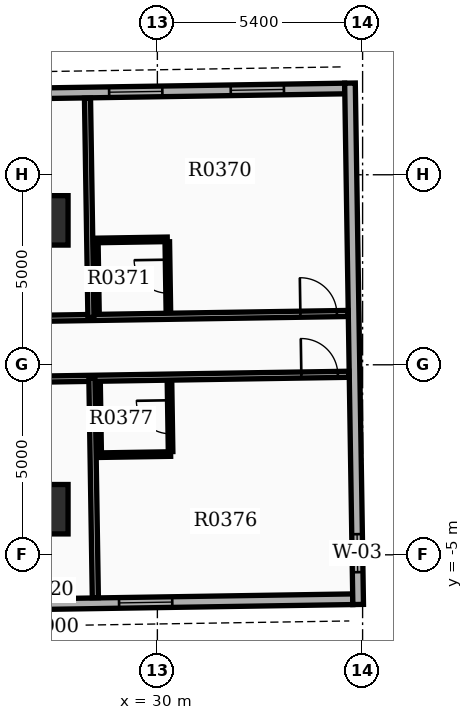
"""IFC4 building model, lengths in metres.
Left out: names, types, materials, properties, quantities, classifications, styles, units other than length and angle.
Written with IfcOpenShell. Run it as: python <this file> out.ifc"""

import sys

from ifc_helpers import new_model, si_unit, direction, frame, frame_2d, origin, origin_2d, place, context, subcontext, project, spatial, rectangle, extrude, element, fill, save


model = new_model("IFC4")
c1 = context("Model", 3, precision=1e-05, world=origin(), true_north=direction((0.0, 1.0)))
c2 = subcontext(c1, "Body", "Model", "MODEL_VIEW")
j1 = project(units=[si_unit("LENGTHUNIT", "METRE"), si_unit("PLANEANGLEUNIT", "RADIAN")], contexts=[c1])
p1 = place(None, origin())
s1 = spatial("IfcSite", under=j1, at=p1, CompositionType="ELEMENT")
p2 = place(p1, origin())
s2 = spatial("IfcBuilding", under=s1, at=p2, CompositionType="ELEMENT")
p3 = place(p2, frame((0.0, 0.0, 27.6)))
s3 = spatial("IfcBuildingStorey", under=s2, at=p3, CompositionType="ELEMENT", Elevation=27.6)
for number, where, z_axis, x_axis in (
    (1, (27.0, -3.8, 0.0), (0.0, 0.0, 1.0), (1.0, 0.0, 0.0)),
    (2, (27.0, 3.8, 0.0), (0.0, 0.0, 1.0), (1.0, 0.0, 0.0)),
):
    element("IfcColumn", number, at=place(p3, frame(where, z_axis=z_axis, x_axis=x_axis)), inside=s3, PredefinedType="COLUMN", context=c2, shape_type="SweptSolid", body=[
        extrude(rectangle(XDim=1.3, YDim=1.3, at=origin_2d()), origin(), (0.0, 0.0, 1.0), 3.9),
    ])
p4 = place(p3, frame((15.044, -6.485, 0.0), z_axis=(0.0, 0.0, 1.0), x_axis=(0.999876474133, 0.01571739401, 0.0)))
e3 = element("IfcWall", 3, at=p4, inside=s3, PredefinedType="STANDARD", context=c2, shape_type="SweptSolid", body=[
    extrude(rectangle(XDim=20.1, YDim=0.28, at=frame_2d((10.05, 0.0))), origin(), (0.0, 0.0, 1.0), 2.91),
])
p5 = place(p4, frame((1.6, 0.0, 0.8)))
e4 = element("IfcOpeningElement", 4, at=p5, cuts=e3, PredefinedType="OPENING", context=c2, shape_type="SweptSolid", body=[
    extrude(rectangle(XDim=1.4, YDim=1.6, at=frame_2d((0.7, 0.8))), frame((0.0, 0.15, 0.0), z_axis=(0.0, -1.0, 0.0), x_axis=(1.0, 0.0, 0.0)), (0.0, 0.0, 1.0), 0.3),
])
p6 = place(p4, frame((6.8, 0.0, 0.8)))
e5 = element("IfcOpeningElement", 5, at=p6, cuts=e3, PredefinedType="OPENING", context=c2, shape_type="SweptSolid", body=[
    extrude(rectangle(XDim=1.4, YDim=1.6, at=frame_2d((0.7, 0.8))), frame((0.0, 0.15, 0.0), z_axis=(0.0, -1.0, 0.0), x_axis=(1.0, 0.0, 0.0)), (0.0, 0.0, 1.0), 0.3),
])
p7 = place(p4, frame((10.0, 0.0, 0.8)))
e6 = element("IfcOpeningElement", 6, at=p7, cuts=e3, PredefinedType="OPENING", context=c2, shape_type="SweptSolid", body=[
    extrude(rectangle(XDim=1.4, YDim=1.6, at=frame_2d((0.7, 0.8))), frame((0.0, 0.15, 0.0), z_axis=(0.0, -1.0, 0.0), x_axis=(1.0, 0.0, 0.0)), (0.0, 0.0, 1.0), 0.3),
])
p8 = place(p4, frame((13.95, 0.0, 0.8)))
e7 = element("IfcOpeningElement", 7, at=p8, cuts=e3, PredefinedType="OPENING", context=c2, shape_type="SweptSolid", body=[
    extrude(rectangle(XDim=1.4, YDim=1.6, at=frame_2d((0.7, 0.8))), frame((0.0, 0.15, 0.0), z_axis=(0.0, -1.0, 0.0), x_axis=(1.0, 0.0, 0.0)), (0.0, 0.0, 1.0), 0.3),
])
p9 = place(p3, frame((34.93, 7.27, 0.0), z_axis=(0.0, 0.0, 1.0), x_axis=(-0.999876667941, -0.015705059908, 0.0)))
e8 = element("IfcWall", 8, at=p9, inside=s3, PredefinedType="STANDARD", context=c2, shape_type="SweptSolid", body=[
    extrude(rectangle(XDim=20.1, YDim=0.28, at=frame_2d((10.05, 0.0))), origin(), (0.0, 0.0, 1.0), 2.91),
])
p10 = place(p9, frame((1.6, 0.0, 0.8)))
e9 = element("IfcOpeningElement", 9, at=p10, cuts=e8, PredefinedType="OPENING", context=c2, shape_type="SweptSolid", body=[
    extrude(rectangle(XDim=1.4, YDim=1.6, at=frame_2d((0.7, 0.8))), frame((0.0, 0.15, 0.0), z_axis=(0.0, -1.0, 0.0), x_axis=(1.0, 0.0, 0.0)), (0.0, 0.0, 1.0), 0.3),
])
p11 = place(p9, frame((4.8, 0.0, 0.8)))
e10 = element("IfcOpeningElement", 10, at=p11, cuts=e8, PredefinedType="OPENING", context=c2, shape_type="SweptSolid", body=[
    extrude(rectangle(XDim=1.4, YDim=1.6, at=frame_2d((0.7, 0.8))), frame((0.0, 0.15, 0.0), z_axis=(0.0, -1.0, 0.0), x_axis=(1.0, 0.0, 0.0)), (0.0, 0.0, 1.0), 0.3),
])
p12 = place(p9, frame((8.0, 0.0, 0.8)))
e11 = element("IfcOpeningElement", 11, at=p12, cuts=e8, PredefinedType="OPENING", context=c2, shape_type="SweptSolid", body=[
    extrude(rectangle(XDim=1.4, YDim=1.6, at=frame_2d((0.7, 0.8))), frame((0.0, 0.15, 0.0), z_axis=(0.0, -1.0, 0.0), x_axis=(1.0, 0.0, 0.0)), (0.0, 0.0, 1.0), 0.3),
])
p13 = place(p9, frame((11.2, 0.0, 0.8)))
e12 = element("IfcOpeningElement", 12, at=p13, cuts=e8, PredefinedType="OPENING", context=c2, shape_type="SweptSolid", body=[
    extrude(rectangle(XDim=1.4, YDim=1.6, at=frame_2d((0.7, 0.8))), frame((0.0, 0.15, 0.0), z_axis=(0.0, -1.0, 0.0), x_axis=(1.0, 0.0, 0.0)), (0.0, 0.0, 1.0), 0.3),
])
p14 = place(p9, frame((15.0, 0.0, 0.0)))
e13 = element("IfcOpeningElement", 13, at=p14, cuts=e8, PredefinedType="OPENING", context=c2, shape_type="SweptSolid", body=[
    extrude(rectangle(XDim=0.96, YDim=2.1, at=frame_2d((0.48, 1.05))), frame((0.0, 0.15, 0.0), z_axis=(0.0, -1.0, 0.0), x_axis=(1.0, 0.0, 0.0)), (0.0, 0.0, 1.0), 0.3),
])
p15 = place(p3, frame((35.283, -6.307, 0.0), z_axis=(0.0, 0.0, 1.0), x_axis=(-0.015712599986, 0.999876549481, 0.0)))
e14 = element("IfcWall", 14, at=p15, inside=s3, PredefinedType="STANDARD", context=c2, shape_type="SweptSolid", body=[
    extrude(rectangle(XDim=13.72, YDim=0.28, at=frame_2d((6.86, 0.0))), origin(), (0.0, 0.0, 1.0), 2.91),
])
p16 = place(p15, frame((0.85, 0.0, 0.85)))
e15 = element("IfcOpeningElement", 15, at=p16, cuts=e14, PredefinedType="OPENING", context=c2, shape_type="SweptSolid", body=[
    extrude(rectangle(XDim=1.0, YDim=1.5, at=frame_2d((0.5, 0.75))), frame((0.0, 0.15, 0.0), z_axis=(0.0, -1.0, 0.0), x_axis=(1.0, 0.0, 0.0)), (0.0, 0.0, 1.0), 0.3),
])
p17 = place(p3, frame((14.836, 1.033, 0.0), z_axis=(0.0, 0.0, 1.0), x_axis=(0.999876717676, 0.015701893165, 0.0)))
e16 = element("IfcWall", 16, at=p17, inside=s3, PredefinedType="PARTITIONING", context=c2, shape_type="SweptSolid", body=[
    extrude(rectangle(XDim=20.182, YDim=0.16, at=frame_2d((10.091, 0.0))), origin(), (0.0, 0.0, 1.0), 2.9),
])
p18 = place(p17, frame((2.61, 0.0, 0.0)))
e17 = element("IfcOpeningElement", 17, at=p18, cuts=e16, PredefinedType="OPENING", context=c2, shape_type="SweptSolid", body=[
    extrude(rectangle(XDim=0.96, YDim=2.15, at=frame_2d((0.48, 1.075))), frame((0.0, 0.09, 0.0), z_axis=(0.0, -1.0, 0.0), x_axis=(1.0, 0.0, 0.0)), (0.0, 0.0, 1.0), 0.18),
])
p19 = place(p17, frame((8.994, 0.0, 0.0)))
e18 = element("IfcOpeningElement", 18, at=p19, cuts=e16, PredefinedType="OPENING", context=c2, shape_type="SweptSolid", body=[
    extrude(rectangle(XDim=0.96, YDim=2.15, at=frame_2d((0.48, 1.075))), frame((0.0, 0.09, 0.0), z_axis=(0.0, -1.0, 0.0), x_axis=(1.0, 0.0, 0.0)), (0.0, 0.0, 1.0), 0.18),
])
p20 = place(p17, frame((18.93, 0.0, 0.0)))
e19 = element("IfcOpeningElement", 19, at=p20, cuts=e16, PredefinedType="OPENING", context=c2, shape_type="SweptSolid", body=[
    extrude(rectangle(XDim=0.96, YDim=2.15, at=frame_2d((0.48, 1.075))), frame((0.0, 0.09, 0.0), z_axis=(0.0, -1.0, 0.0), x_axis=(1.0, 0.0, 0.0)), (0.0, 0.0, 1.0), 0.18),
])
p21 = place(p3, frame((28.252, 1.244, 0.0), z_axis=(0.0, 0.0, 1.0), x_axis=(-0.015692470796, 0.999876865599, 0.0)))
e20 = element("IfcWall", 20, at=p21, inside=s3, PredefinedType="PARTITIONING", context=c2, shape_type="SweptSolid", body=[
    extrude(rectangle(XDim=5.772, YDim=0.16, at=frame_2d((2.886, 0.0))), origin(), (0.0, 0.0, 1.0), 2.9),
])
p22 = place(p3, frame((30.29, 1.416, 0.0), z_axis=(0.0, 0.0, 1.0), x_axis=(-0.015696442504, 0.999876803258, 0.0)))
e21 = element("IfcWall", 21, at=p22, inside=s3, PredefinedType="PARTITIONING", context=c2, shape_type="SweptSolid", body=[
    extrude(rectangle(XDim=1.82, YDim=0.12, at=frame_2d((0.91, 0.0))), origin(), (0.0, 0.0, 1.0), 2.9),
])
p23 = place(p22, frame((0.47, 0.0, 0.0)))
e22 = element("IfcOpeningElement", 22, at=p23, cuts=e21, PredefinedType="OPENING", context=c2, shape_type="SweptSolid", body=[
    extrude(rectangle(XDim=0.88, YDim=2.1, at=frame_2d((0.44, 1.05))), frame((0.0, 0.07, 0.0), z_axis=(0.0, -1.0, 0.0), x_axis=(1.0, 0.0, 0.0)), (0.0, 0.0, 1.0), 0.14),
])
p24 = place(p3, frame((28.41, 1.386, 0.0), z_axis=(0.0, 0.0, 1.0), x_axis=(-0.015694337248, 0.999876836305, 0.0)))
e23 = element("IfcWall", 23, at=p24, inside=s3, PredefinedType="PARTITIONING", context=c2, shape_type="SweptSolid", body=[
    extrude(rectangle(XDim=1.82, YDim=0.12, at=frame_2d((0.91, 0.0))), origin(), (0.0, 0.0, 1.0), 2.9),
])
p25 = place(p3, frame((28.38, 3.271, 0.0), z_axis=(0.0, 0.0, 1.0), x_axis=(0.999876553475, 0.01571234584, 0.0)))
e24 = element("IfcWall", 24, at=p25, inside=s3, PredefinedType="PARTITIONING", context=c2, shape_type="SweptSolid", body=[
    extrude(rectangle(XDim=1.88, YDim=0.12, at=frame_2d((0.94, 0.0))), origin(), (0.0, 0.0, 1.0), 2.9),
])
p26 = place(p3, frame((14.861, -0.567, 0.0), z_axis=(0.0, 0.0, 1.0), x_axis=(0.999876530668, 0.015713797103, 0.0)))
e25 = element("IfcWall", 25, at=p26, inside=s3, PredefinedType="PARTITIONING", context=c2, shape_type="SweptSolid", body=[
    extrude(rectangle(XDim=20.182, YDim=0.16, at=frame_2d((10.091, 0.0))), origin(), (0.0, 0.0, 1.0), 2.9),
])
p27 = place(p26, frame((2.61, 0.0, 0.0)))
e26 = element("IfcOpeningElement", 26, at=p27, cuts=e25, PredefinedType="OPENING", context=c2, shape_type="SweptSolid", body=[
    extrude(rectangle(XDim=0.96, YDim=2.15, at=frame_2d((0.48, 1.075))), frame((0.0, 0.09, 0.0), z_axis=(0.0, -1.0, 0.0), x_axis=(1.0, 0.0, 0.0)), (0.0, 0.0, 1.0), 0.18),
])
p28 = place(p26, frame((8.994, 0.0, 0.0)))
e27 = element("IfcOpeningElement", 27, at=p28, cuts=e25, PredefinedType="OPENING", context=c2, shape_type="SweptSolid", body=[
    extrude(rectangle(XDim=0.96, YDim=2.15, at=frame_2d((0.48, 1.075))), frame((0.0, 0.09, 0.0), z_axis=(0.0, -1.0, 0.0), x_axis=(1.0, 0.0, 0.0)), (0.0, 0.0, 1.0), 0.18),
])
p29 = place(p26, frame((18.93, 0.0, 0.0)))
e28 = element("IfcOpeningElement", 28, at=p29, cuts=e25, PredefinedType="OPENING", context=c2, shape_type="SweptSolid", body=[
    extrude(rectangle(XDim=0.96, YDim=2.15, at=frame_2d((0.48, 1.075))), frame((0.0, 0.09, 0.0), z_axis=(0.0, -1.0, 0.0), x_axis=(1.0, 0.0, 0.0)), (0.0, 0.0, 1.0), 0.18),
])
p30 = place(p3, frame((28.277, -0.356, 0.0), z_axis=(0.0, 0.0, 1.0), x_axis=(0.015734758102, -0.999876201031, 0.0)))
e29 = element("IfcWall", 29, at=p30, inside=s3, PredefinedType="PARTITIONING", context=c2, shape_type="SweptSolid", body=[
    extrude(rectangle(XDim=5.772, YDim=0.16, at=frame_2d((2.886, 0.0))), origin(), (0.0, 0.0, 1.0), 2.9),
])
p31 = place(p3, frame((30.348, -2.284, 0.0), z_axis=(0.0, 0.0, 1.0), x_axis=(-0.015694337248, 0.999876836305, 0.0)))
e30 = element("IfcWall", 30, at=p31, inside=s3, PredefinedType="PARTITIONING", context=c2, shape_type="SweptSolid", body=[
    extrude(rectangle(XDim=1.82, YDim=0.12, at=frame_2d((0.91, 0.0))), origin(), (0.0, 0.0, 1.0), 2.9),
])
p32 = place(p31, frame((0.47, 0.0, 0.0)))
e31 = element("IfcOpeningElement", 31, at=p32, cuts=e30, PredefinedType="OPENING", context=c2, shape_type="SweptSolid", body=[
    extrude(rectangle(XDim=0.88, YDim=2.1, at=frame_2d((0.44, 1.05))), frame((0.0, 0.07, 0.0), z_axis=(0.0, -1.0, 0.0), x_axis=(1.0, 0.0, 0.0)), (0.0, 0.0, 1.0), 0.14),
])
p33 = place(p3, frame((28.468, -2.313, 0.0), z_axis=(0.0, 0.0, 1.0), x_axis=(-0.015696442504, 0.999876803258, 0.0)))
e32 = element("IfcWall", 32, at=p33, inside=s3, PredefinedType="PARTITIONING", context=c2, shape_type="SweptSolid", body=[
    extrude(rectangle(XDim=1.82, YDim=0.12, at=frame_2d((0.91, 0.0))), origin(), (0.0, 0.0, 1.0), 2.9),
])
p34 = place(p3, frame((28.469, -2.378, 0.0), z_axis=(0.0, 0.0, 1.0), x_axis=(0.99987652141, 0.015714386166, 0.0)))
e33 = element("IfcWall", 33, at=p34, inside=s3, PredefinedType="PARTITIONING", context=c2, shape_type="SweptSolid", body=[
    extrude(rectangle(XDim=1.88, YDim=0.12, at=frame_2d((0.94, 0.0))), origin(), (0.0, 0.0, 1.0), 2.9),
])
p35 = place(p8, origin())
e34 = element("IfcWindow", 34, at=p35, inside=s3, PartitioningType="SINGLE_PANEL", PredefinedType="WINDOW", context=c2, shape_type="SweptSolid", body=[
    extrude(rectangle(XDim=1.4, YDim=1.6, at=frame_2d((0.7, 0.8))), frame((0.0, 0.03, 0.0), z_axis=(0.0, -1.0, 0.0), x_axis=(1.0, 0.0, 0.0)), (0.0, 0.0, 1.0), 0.06),
])
fill(e7, e34)
p36 = place(p10, origin())
e35 = element("IfcWindow", 35, at=p36, inside=s3, PartitioningType="SINGLE_PANEL", PredefinedType="WINDOW", context=c2, shape_type="SweptSolid", body=[
    extrude(rectangle(XDim=1.4, YDim=1.6, at=frame_2d((0.7, 0.8))), frame((0.0, 0.03, 0.0), z_axis=(0.0, -1.0, 0.0), x_axis=(1.0, 0.0, 0.0)), (0.0, 0.0, 1.0), 0.06),
])
fill(e9, e35)
p37 = place(p11, origin())
e36 = element("IfcWindow", 36, at=p37, inside=s3, PartitioningType="SINGLE_PANEL", PredefinedType="WINDOW", context=c2, shape_type="SweptSolid", body=[
    extrude(rectangle(XDim=1.4, YDim=1.6, at=frame_2d((0.7, 0.8))), frame((0.0, 0.03, 0.0), z_axis=(0.0, -1.0, 0.0), x_axis=(1.0, 0.0, 0.0)), (0.0, 0.0, 1.0), 0.06),
])
fill(e10, e36)
p38 = place(p16, origin())
e37 = element("IfcWindow", 37, at=p38, inside=s3, PartitioningType="SINGLE_PANEL", PredefinedType="WINDOW", context=c2, shape_type="SweptSolid", body=[
    extrude(rectangle(XDim=1.0, YDim=1.5, at=frame_2d((0.5, 0.75))), frame((0.0, 0.03, 0.0), z_axis=(0.0, -1.0, 0.0), x_axis=(1.0, 0.0, 0.0)), (0.0, 0.0, 1.0), 0.06),
])
fill(e15, e37)
p39 = place(p20, origin())
e38 = element("IfcDoor", 38, at=p39, inside=s3, OperationType="SINGLE_SWING_LEFT", PredefinedType="DOOR", context=c2, shape_type="SweptSolid", body=[
    extrude(rectangle(XDim=0.96, YDim=2.15, at=frame_2d((0.48, 1.075))), frame((0.0, 0.025, 0.0), z_axis=(0.0, -1.0, 0.0), x_axis=(1.0, 0.0, 0.0)), (0.0, 0.0, 1.0), 0.05),
])
fill(e19, e38)
p40 = place(p23, origin())
e39 = element("IfcDoor", 39, at=p40, inside=s3, OperationType="SINGLE_SWING_RIGHT", PredefinedType="DOOR", context=c2, shape_type="SweptSolid", body=[
    extrude(rectangle(XDim=0.88, YDim=2.1, at=frame_2d((0.44, 1.05))), frame((0.0, 0.025, 0.0), z_axis=(0.0, -1.0, 0.0), x_axis=(1.0, 0.0, 0.0)), (0.0, 0.0, 1.0), 0.05),
])
fill(e22, e39)
p41 = place(p29, origin())
e40 = element("IfcDoor", 40, at=p41, inside=s3, OperationType="SINGLE_SWING_LEFT", PredefinedType="DOOR", context=c2, shape_type="SweptSolid", body=[
    extrude(rectangle(XDim=0.96, YDim=2.15, at=frame_2d((0.48, 1.075))), frame((0.0, 0.025, 0.0), z_axis=(0.0, -1.0, 0.0), x_axis=(1.0, 0.0, 0.0)), (0.0, 0.0, 1.0), 0.05),
])
fill(e28, e40)
p42 = place(p32, origin())
e41 = element("IfcDoor", 41, at=p42, inside=s3, OperationType="SINGLE_SWING_RIGHT", PredefinedType="DOOR", context=c2, shape_type="SweptSolid", body=[
    extrude(rectangle(XDim=0.88, YDim=2.1, at=frame_2d((0.44, 1.05))), frame((0.0, 0.025, 0.0), z_axis=(0.0, -1.0, 0.0), x_axis=(1.0, 0.0, 0.0)), (0.0, 0.0, 1.0), 0.05),
])
fill(e31, e41)
save(model, sys.argv[1])
